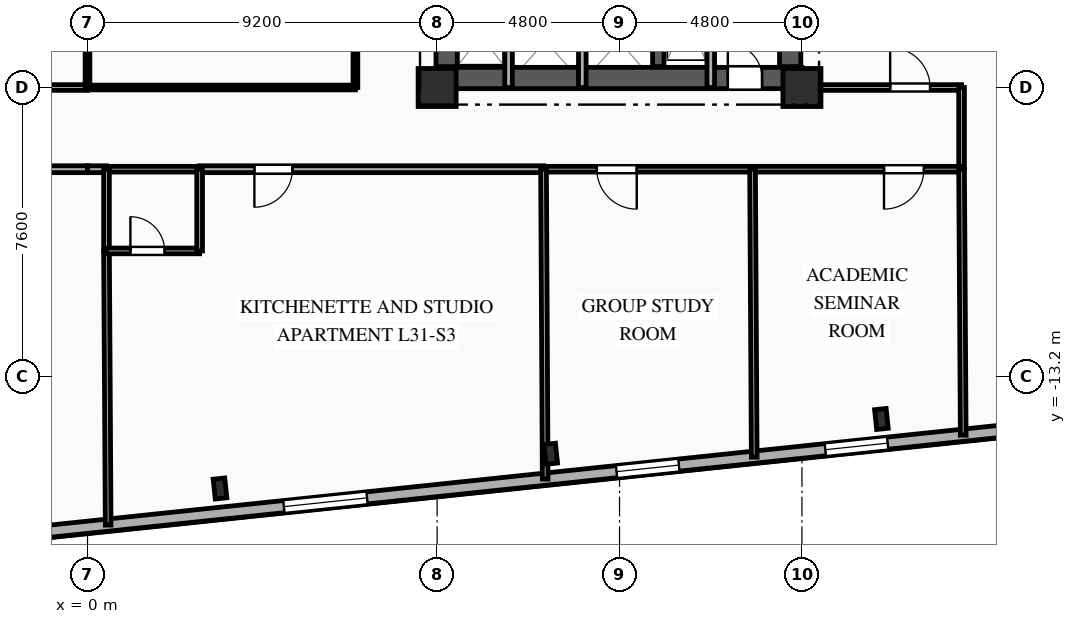
"""IFC4 building model, lengths in metres.
Left out: names, types, materials, properties, quantities, classifications, styles, units other than length and angle.
Written with IfcOpenShell. Run it as: python <this file> out.ifc"""

import sys

from ifc_helpers import new_model, si_unit, direction, frame, frame_2d, origin, origin_2d, place, context, subcontext, project, spatial, rectangle, i_section, extrude, element, fill, save


model = new_model("IFC4")
c1 = context("Model", 3, precision=1e-05, world=origin(), true_north=direction((0.0, 1.0)))
c2 = subcontext(c1, "Body", "Model", "MODEL_VIEW")
j1 = project(units=[si_unit("LENGTHUNIT", "METRE"), si_unit("PLANEANGLEUNIT", "RADIAN")], contexts=[c1])
p1 = place(None, origin())
s1 = spatial("IfcSite", under=j1, at=p1, CompositionType="ELEMENT")
p2 = place(p1, origin())
s2 = spatial("IfcBuilding", under=s1, at=p2, CompositionType="ELEMENT")
p3 = place(p2, frame((0.0, 0.0, 112.5)))
s3 = spatial("IfcBuildingStorey", under=s2, at=p3, CompositionType="ELEMENT", Elevation=112.5)
for number, where, z_axis, x_axis in (
    (1, (9.2, -5.6, 0.0), (0.0, 0.0, 1.0), (1.0, 0.0, 0.0)),
    (2, (18.8, -5.6, 0.0), (0.0, 0.0, 1.0), (1.0, 0.0, 0.0)),
):
    element("IfcColumn", number, at=place(p3, frame(where, z_axis=z_axis, x_axis=x_axis)), inside=s3, PredefinedType="COLUMN", context=c2, shape_type="SweptSolid", body=[
        extrude(rectangle(XDim=1.0, YDim=1.0, at=origin_2d()), origin(), (0.0, 0.0, 1.0), 3.35),
    ])
for number, where, z_axis, x_axis in (
    (3, (3.487, -16.151, 0.0), (0.0, 0.0, 1.0), (0.995, 0.105, 0.0)),
    (4, (12.189, -15.237, 0.0), (0.0, 0.0, 1.0), (0.995, 0.105, 0.0)),
    (5, (20.891, -14.322, 0.0), (0.0, 0.0, 1.0), (0.995, 0.105, 0.0)),
):
    element("IfcColumn", number, at=place(p3, frame(where, z_axis=z_axis, x_axis=x_axis)), inside=s3, PredefinedType="COLUMN", context=c2, shape_type="SweptSolid", body=[
        extrude(i_section(OverallWidth=0.306, OverallDepth=0.524, WebThickness=0.021, FlangeThickness=0.04, FilletRadius=0.027, at=origin_2d()), origin(), (0.0, 0.0, 1.0), 3.35),
    ])
p4 = place(p3, frame((30.307, -13.986, 0.0), z_axis=(0.0, 0.0, 1.0), x_axis=(-0.994521628355, -0.104531003701, 0.0)))
e6 = element("IfcWall", 6, at=p4, inside=s3, PredefinedType="SOLIDWALL", context=c2, shape_type="SweptSolid", body=[
    extrude(rectangle(XDim=53.8, YDim=0.32, at=frame_2d((26.9, 0.0))), origin(), (0.0, 0.0, 1.0), 3.045),
])
p5 = place(p4, frame((3.098, 0.0, 0.85)))
e7 = element("IfcOpeningElement", 7, at=p5, cuts=e6, PredefinedType="OPENING", context=c2, shape_type="SweptSolid", body=[
    extrude(rectangle(XDim=1.65, YDim=1.85, at=frame_2d((0.825, 0.925))), frame((0.0, 0.17, 0.0), z_axis=(0.0, -1.0, 0.0), x_axis=(1.0, 0.0, 0.0)), (0.0, 0.0, 1.0), 0.34),
])
p6 = place(p4, frame((9.302, 0.0, 0.85)))
e8 = element("IfcOpeningElement", 8, at=p6, cuts=e6, PredefinedType="OPENING", context=c2, shape_type="SweptSolid", body=[
    extrude(rectangle(XDim=1.65, YDim=1.85, at=frame_2d((0.825, 0.925))), frame((0.0, 0.17, 0.0), z_axis=(0.0, -1.0, 0.0), x_axis=(1.0, 0.0, 0.0)), (0.0, 0.0, 1.0), 0.34),
])
p7 = place(p4, frame((14.827, 0.0, 0.85)))
e9 = element("IfcOpeningElement", 9, at=p7, cuts=e6, PredefinedType="OPENING", context=c2, shape_type="SweptSolid", body=[
    extrude(rectangle(XDim=1.65, YDim=1.85, at=frame_2d((0.825, 0.925))), frame((0.0, 0.17, 0.0), z_axis=(0.0, -1.0, 0.0), x_axis=(1.0, 0.0, 0.0)), (0.0, 0.0, 1.0), 0.34),
])
p8 = place(p4, frame((23.078, 0.0, 0.85)))
e10 = element("IfcOpeningElement", 10, at=p8, cuts=e6, PredefinedType="OPENING", context=c2, shape_type="SweptSolid", body=[
    extrude(rectangle(XDim=2.2, YDim=1.85, at=frame_2d((1.1, 0.925))), frame((0.0, 0.17, 0.0), z_axis=(0.0, -1.0, 0.0), x_axis=(1.0, 0.0, 0.0)), (0.0, 0.0, 1.0), 0.34),
])
p9 = place(p4, frame((34.646, 0.0, 0.85)))
e11 = element("IfcOpeningElement", 11, at=p9, cuts=e6, PredefinedType="OPENING", context=c2, shape_type="SweptSolid", body=[
    extrude(rectangle(XDim=2.2, YDim=1.85, at=frame_2d((1.1, 0.925))), frame((0.0, 0.17, 0.0), z_axis=(0.0, -1.0, 0.0), x_axis=(1.0, 0.0, 0.0)), (0.0, 0.0, 1.0), 0.34),
])
p10 = place(p4, frame((43.728, 0.0, 0.85)))
e12 = element("IfcOpeningElement", 12, at=p10, cuts=e6, PredefinedType="OPENING", context=c2, shape_type="SweptSolid", body=[
    extrude(rectangle(XDim=1.65, YDim=1.85, at=frame_2d((0.825, 0.925))), frame((0.0, 0.17, 0.0), z_axis=(0.0, -1.0, 0.0), x_axis=(1.0, 0.0, 0.0)), (0.0, 0.0, 1.0), 0.34),
])
p11 = place(p4, frame((49.653, 0.0, 0.85)))
e13 = element("IfcOpeningElement", 13, at=p11, cuts=e6, PredefinedType="OPENING", context=c2, shape_type="SweptSolid", body=[
    extrude(rectangle(XDim=1.65, YDim=1.85, at=frame_2d((0.825, 0.925))), frame((0.0, 0.17, 0.0), z_axis=(0.0, -1.0, 0.0), x_axis=(1.0, 0.0, 0.0)), (0.0, 0.0, 1.0), 0.34),
])
p12 = place(p3, frame((9.2, -5.35, 0.0), z_axis=(0.0, 0.0, 1.0), x_axis=(1.0, 0.0, 0.0)))
e14 = element("IfcWall", 14, at=p12, inside=s3, PredefinedType="SHEAR", context=c2, shape_type="SweptSolid", body=[
    extrude(rectangle(XDim=9.6, YDim=0.56, at=frame_2d((4.8, 0.0))), origin(), (0.0, 0.0, 1.0), 3.045),
])
p13 = place(p12, frame((7.65, 0.0, 0.0)))
e15 = element("IfcOpeningElement", 15, at=p13, cuts=e14, PredefinedType="OPENING", context=c2, shape_type="SweptSolid", body=[
    extrude(rectangle(XDim=0.9, YDim=2.1, at=frame_2d((0.45, 1.05))), frame((0.0, 0.29, 0.0), z_axis=(0.0, -1.0, 0.0), x_axis=(1.0, 0.0, 0.0)), (0.0, 0.0, 1.0), 0.58),
])
p14 = place(p3, frame((9.45, -5.05, 0.0), z_axis=(0.0, 0.0, 1.0), x_axis=(0.0, 1.0, 0.0)))
e16 = element("IfcWall", 16, at=p14, inside=s3, PredefinedType="SHEAR", context=c2, shape_type="SweptSolid", body=[
    extrude(rectangle(XDim=10.1, YDim=0.56, at=frame_2d((5.05, 0.0))), origin(), (0.0, 0.0, 1.0), 3.045),
])
p15 = place(p14, frame((7.15, 0.0, 0.0)))
e17 = element("IfcOpeningElement", 17, at=p15, cuts=e16, PredefinedType="OPENING", context=c2, shape_type="SweptSolid", body=[
    extrude(rectangle(XDim=0.9, YDim=2.1, at=frame_2d((0.45, 1.05))), frame((0.0, 0.29, 0.0), z_axis=(0.0, -1.0, 0.0), x_axis=(1.0, 0.0, 0.0)), (0.0, 0.0, 1.0), 0.58),
])
p16 = place(p14, frame((2.4, 0.0, 0.0)))
e18 = element("IfcOpeningElement", 18, at=p16, cuts=e16, PredefinedType="OPENING", context=c2, shape_type="SweptSolid", body=[
    extrude(rectangle(XDim=1.2, YDim=2.15, at=frame_2d((0.6, 1.075))), frame((0.0, 0.29, 0.0), z_axis=(0.0, -1.0, 0.0), x_axis=(1.0, 0.0, 0.0)), (0.0, 0.0, 1.0), 0.58),
])
p17 = place(p3, frame((18.49, -5.05, 0.0), z_axis=(0.0, 0.0, 1.0), x_axis=(0.0, 1.0, 0.0)))
e19 = element("IfcWall", 19, at=p17, inside=s3, PredefinedType="SHEAR", context=c2, shape_type="SweptSolid", body=[
    extrude(rectangle(XDim=10.1, YDim=0.56, at=frame_2d((5.05, 0.0))), origin(), (0.0, 0.0, 1.0), 3.045),
])
p18 = place(p3, frame((15.02, -5.05, 0.0), z_axis=(0.0, 0.0, 1.0), x_axis=(0.0, 1.0, 0.0)))
e20 = element("IfcWall", 20, at=p18, inside=s3, PredefinedType="SHEAR", context=c2, shape_type="SweptSolid", body=[
    extrude(rectangle(XDim=10.1, YDim=0.3, at=frame_2d((5.05, 0.0))), origin(), (0.0, 0.0, 1.0), 3.045),
])
p19 = place(p3, frame((16.4, -2.11, 0.0), z_axis=(0.0, 0.0, 1.0), x_axis=(0.0, -1.0, 0.0)))
e21 = element("IfcWall", 21, at=p19, inside=s3, PredefinedType="PARTITIONING", context=c2, shape_type="SweptSolid", body=[
    extrude(rectangle(XDim=3.49, YDim=0.2, at=frame_2d((1.745, 0.0))), origin(), (0.0, 0.0, 1.0), 3.045),
])
for number, where, z_axis, x_axis in (
    (22, (11.08, -5.6, 0.0), (0.0, 0.0, 1.0), (0.0, 1.0, 0.0)),
    (23, (13.02, -5.6, 0.0), (0.0, 0.0, 1.0), (0.0, 1.0, 0.0)),
):
    element("IfcWall", number, at=place(p3, frame(where, z_axis=z_axis, x_axis=x_axis)), inside=s3, PredefinedType="PARTITIONING", context=c2, shape_type="SweptSolid", body=[
        extrude(rectangle(XDim=2.25, YDim=0.2, at=frame_2d((1.125, 0.0))), origin(), (0.0, 0.0, 1.0), 3.045),
    ])
p20 = place(p3, frame((0.0, -7.75, 0.0), z_axis=(0.0, 0.0, 1.0), x_axis=(-1.0, 0.0, 0.0)))
e24 = element("IfcWall", 24, at=p20, inside=s3, PredefinedType="PARTITIONING", context=c2, shape_type="SweptSolid", body=[
    extrude(rectangle(XDim=8.55, YDim=0.18, at=frame_2d((4.275, 0.0))), origin(), (0.0, 0.0, 1.0), 3.045),
])
p21 = place(p20, frame((1.379, 0.0, 0.0)))
e25 = element("IfcOpeningElement", 25, at=p21, cuts=e24, PredefinedType="OPENING", context=c2, shape_type="SweptSolid", body=[
    extrude(rectangle(XDim=1.0, YDim=2.15, at=frame_2d((0.5, 1.075))), frame((0.0, 0.1, 0.0), z_axis=(0.0, -1.0, 0.0), x_axis=(1.0, 0.0, 0.0)), (0.0, 0.0, 1.0), 0.2),
])
p22 = place(p3, frame((-7.05, -5.6, 0.0), z_axis=(0.0, 0.0, 1.0), x_axis=(1.0, 0.0, 0.0)))
e26 = element("IfcWall", 26, at=p22, inside=s3, PredefinedType="PARTITIONING", context=c2, shape_type="SweptSolid", body=[
    extrude(rectangle(XDim=7.05, YDim=0.15, at=frame_2d((3.525, 0.0))), origin(), (0.0, 0.0, 1.0), 2.53),
])
p23 = place(p3, frame((18.8, -5.6, 0.0), z_axis=(0.0, 0.0, 1.0), x_axis=(1.0, 0.0, 0.0)))
e27 = element("IfcWall", 27, at=p23, inside=s3, PredefinedType="PARTITIONING", context=c2, shape_type="SweptSolid", body=[
    extrude(rectangle(XDim=4.2, YDim=0.15, at=frame_2d((2.1, 0.0))), origin(), (0.0, 0.0, 1.0), 2.53),
])
p24 = place(p23, frame((2.321, 0.0, 0.0)))
e28 = element("IfcOpeningElement", 28, at=p24, cuts=e27, PredefinedType="OPENING", context=c2, shape_type="SweptSolid", body=[
    extrude(rectangle(XDim=1.05, YDim=2.15, at=frame_2d((0.525, 1.075))), frame((0.0, 0.085, 0.0), z_axis=(0.0, -1.0, 0.0), x_axis=(1.0, 0.0, 0.0)), (0.0, 0.0, 1.0), 0.17),
])
p25 = place(p3, frame((23.0, -5.6, 0.0), z_axis=(0.0, 0.0, 1.0), x_axis=(0.0, -1.0, 0.0)))
e29 = element("IfcWall", 29, at=p25, inside=s3, PredefinedType="PARTITIONING", context=c2, shape_type="SweptSolid", body=[
    extrude(rectangle(XDim=2.15, YDim=0.15, at=frame_2d((1.075, 0.0))), origin(), (0.0, 0.0, 1.0), 3.045),
])
p26 = place(p3, frame((0.5, -7.75, 0.0), z_axis=(0.0, 0.0, 1.0), x_axis=(-1.0, 0.0, 0.0)))
e30 = element("IfcWall", 30, at=p26, inside=s3, PredefinedType="PARTITIONING", context=c2, shape_type="SweptSolid", body=[
    extrude(rectangle(XDim=0.5, YDim=0.18, at=frame_2d((0.25, 0.0))), origin(), (0.0, 0.0, 1.0), 3.045),
])
p27 = place(p3, frame((12.0, -7.75, 0.0), z_axis=(0.0, 0.0, 1.0), x_axis=(-1.0, 0.0, 0.0)))
e31 = element("IfcWall", 31, at=p27, inside=s3, PredefinedType="PARTITIONING", context=c2, shape_type="SweptSolid", body=[
    extrude(rectangle(XDim=9.05, YDim=0.18, at=frame_2d((4.525, 0.0))), origin(), (0.0, 0.0, 1.0), 3.045),
])
p28 = place(p27, frame((6.609, 0.0, 0.0)))
e32 = element("IfcOpeningElement", 32, at=p28, cuts=e31, PredefinedType="OPENING", context=c2, shape_type="SweptSolid", body=[
    extrude(rectangle(XDim=1.0, YDim=2.15, at=frame_2d((0.5, 1.075))), frame((0.0, 0.1, 0.0), z_axis=(0.0, -1.0, 0.0), x_axis=(1.0, 0.0, 0.0)), (0.0, 0.0, 1.0), 0.2),
])
p29 = place(p3, frame((2.95, -7.75, 0.0), z_axis=(0.0, 0.0, 1.0), x_axis=(-1.0, 0.0, 0.0)))
e33 = element("IfcWall", 33, at=p29, inside=s3, PredefinedType="PLUMBINGWALL", context=c2, shape_type="SweptSolid", body=[
    extrude(rectangle(XDim=2.45, YDim=0.15, at=frame_2d((1.225, 0.0))), origin(), (0.0, 0.0, 1.0), 3.045),
])
p30 = place(p3, frame((17.5, -7.75, 0.0), z_axis=(0.0, 0.0, 1.0), x_axis=(-1.0, 0.0, 0.0)))
e34 = element("IfcWall", 34, at=p30, inside=s3, PredefinedType="PARTITIONING", context=c2, shape_type="SweptSolid", body=[
    extrude(rectangle(XDim=5.5, YDim=0.15, at=frame_2d((2.75, 0.0))), origin(), (0.0, 0.0, 1.0), 3.045),
])
p31 = place(p30, frame((3.048, 0.0, 0.0)))
e35 = element("IfcOpeningElement", 35, at=p31, cuts=e34, PredefinedType="OPENING", context=c2, shape_type="SweptSolid", body=[
    extrude(rectangle(XDim=1.05, YDim=2.15, at=frame_2d((0.525, 1.075))), frame((0.0, 0.085, 0.0), z_axis=(0.0, -1.0, 0.0), x_axis=(1.0, 0.0, 0.0)), (0.0, 0.0, 1.0), 0.17),
])
p32 = place(p3, frame((23.0, -7.75, 0.0), z_axis=(0.0, 0.0, 1.0), x_axis=(-1.0, 0.0, 0.0)))
e36 = element("IfcWall", 36, at=p32, inside=s3, PredefinedType="PARTITIONING", context=c2, shape_type="SweptSolid", body=[
    extrude(rectangle(XDim=5.5, YDim=0.15, at=frame_2d((2.75, 0.0))), origin(), (0.0, 0.0, 1.0), 3.045),
])
p33 = place(p32, frame((0.991, 0.0, 0.0)))
e37 = element("IfcOpeningElement", 37, at=p33, cuts=e36, PredefinedType="OPENING", context=c2, shape_type="SweptSolid", body=[
    extrude(rectangle(XDim=1.05, YDim=2.15, at=frame_2d((0.525, 1.075))), frame((0.0, 0.085, 0.0), z_axis=(0.0, -1.0, 0.0), x_axis=(1.0, 0.0, 0.0)), (0.0, 0.0, 1.0), 0.17),
])
p34 = place(p3, frame((0.0, -5.6, 0.0), z_axis=(0.0, 0.0, 1.0), x_axis=(1.0, 0.0, 0.0)))
e38 = element("IfcWall", 38, at=p34, inside=s3, PredefinedType="PARTITIONING", context=c2, shape_type="SweptSolid", body=[
    extrude(rectangle(XDim=7.05, YDim=0.125, at=frame_2d((3.525, 0.0))), origin(), (0.0, 0.0, 1.0), 2.53),
])
p35 = place(p3, frame((7.05, -5.6, 0.0), z_axis=(0.0, 0.0, 1.0), x_axis=(0.0, 1.0, 0.0)))
e39 = element("IfcWall", 39, at=p35, inside=s3, PredefinedType="PARTITIONING", context=c2, shape_type="SweptSolid", body=[
    extrude(rectangle(XDim=14.1, YDim=0.125, at=frame_2d((7.05, 0.0))), origin(), (0.0, 0.0, 1.0), 3.045),
])
p36 = place(p35, frame((5.076, 0.0, 0.0)))
e40 = element("IfcOpeningElement", 40, at=p36, cuts=e39, PredefinedType="OPENING", context=c2, shape_type="SweptSolid", body=[
    extrude(rectangle(XDim=0.95, YDim=2.1, at=frame_2d((0.475, 1.05))), frame((0.0, 0.073, 0.0), z_axis=(0.0, -1.0, 0.0), x_axis=(1.0, 0.0, 0.0)), (0.0, 0.0, 1.0), 0.145),
])
p37 = place(p3, frame((23.044, -14.749, 0.0), z_axis=(0.0, 0.0, 1.0), x_axis=(-0.006278653971, 0.999980289058, 0.0)))
e41 = element("IfcWall", 41, at=p37, inside=s3, PredefinedType="PARTITIONING", context=c2, shape_type="SweptSolid", body=[
    extrude(rectangle(XDim=6.999, YDim=0.15, at=frame_2d((3.5, 0.0))), origin(), (0.0, 0.0, 1.0), 3.045),
])
p38 = place(p3, frame((0.5, -9.9, 0.0), z_axis=(0.0, 0.0, 1.0), x_axis=(0.006091463685, -0.999981446863, 0.0)))
e42 = element("IfcWall", 42, at=p38, inside=s3, PredefinedType="PARTITIONING", context=c2, shape_type="SweptSolid", body=[
    extrude(rectangle(XDim=7.214, YDim=0.15, at=frame_2d((3.607, 0.0))), origin(), (0.0, 0.0, 1.0), 3.045),
])
p39 = place(p3, frame((0.5, -7.75, 0.0), z_axis=(0.0, 0.0, 1.0), x_axis=(0.0, -1.0, 0.0)))
e43 = element("IfcWall", 43, at=p39, inside=s3, PredefinedType="PLUMBINGWALL", context=c2, shape_type="SweptSolid", body=[
    extrude(rectangle(XDim=2.15, YDim=0.15, at=frame_2d((1.075, 0.0))), origin(), (0.0, 0.0, 1.0), 3.045),
])
p40 = place(p3, frame((0.5, -9.9, 0.0), z_axis=(0.0, 0.0, 1.0), x_axis=(1.0, 0.0, 0.0)))
e44 = element("IfcWall", 44, at=p40, inside=s3, PredefinedType="PLUMBINGWALL", context=c2, shape_type="SweptSolid", body=[
    extrude(rectangle(XDim=2.45, YDim=0.15, at=frame_2d((1.225, 0.0))), origin(), (0.0, 0.0, 1.0), 3.045),
])
p41 = place(p40, frame((0.629, 0.0, 0.0)))
e45 = element("IfcOpeningElement", 45, at=p41, cuts=e44, PredefinedType="OPENING", context=c2, shape_type="SweptSolid", body=[
    extrude(rectangle(XDim=0.9, YDim=2.1, at=frame_2d((0.45, 1.05))), frame((0.0, 0.085, 0.0), z_axis=(0.0, -1.0, 0.0), x_axis=(1.0, 0.0, 0.0)), (0.0, 0.0, 1.0), 0.17),
])
p42 = place(p3, frame((2.95, -9.9, 0.0), z_axis=(0.0, 0.0, 1.0), x_axis=(0.0, 1.0, 0.0)))
e46 = element("IfcWall", 46, at=p42, inside=s3, PredefinedType="PLUMBINGWALL", context=c2, shape_type="SweptSolid", body=[
    extrude(rectangle(XDim=2.15, YDim=0.15, at=frame_2d((1.075, 0.0))), origin(), (0.0, 0.0, 1.0), 3.045),
])
p43 = place(p3, frame((12.0, -7.75, 0.0), z_axis=(0.0, 0.0, 1.0), x_axis=(0.005388497987, -0.999985481939, 0.0)))
e47 = element("IfcWall", 47, at=p43, inside=s3, PredefinedType="PARTITIONING", context=c2, shape_type="SweptSolid", body=[
    extrude(rectangle(XDim=8.155, YDim=0.15, at=frame_2d((4.078, 0.0))), origin(), (0.0, 0.0, 1.0), 2.53),
])
p44 = place(p3, frame((17.5, -7.75, 0.0), z_axis=(0.0, 0.0, 1.0), x_axis=(0.005799618919, -0.999983182069, 0.0)))
e48 = element("IfcWall", 48, at=p44, inside=s3, PredefinedType="PARTITIONING", context=c2, shape_type="SweptSolid", body=[
    extrude(rectangle(XDim=7.577, YDim=0.15, at=frame_2d((3.789, 0.0))), origin(), (0.0, 0.0, 1.0), 3.045),
])
p45 = place(p3, frame((0.0, 8.5, 0.0), z_axis=(0.0, 0.0, 1.0), x_axis=(0.0, -1.0, 0.0)))
e49 = element("IfcWall", 49, at=p45, inside=s3, PredefinedType="PARTITIONING", context=c2, shape_type="SweptSolid", body=[
    extrude(rectangle(XDim=14.1, YDim=0.125, at=frame_2d((7.05, 0.0))), origin(), (0.0, 0.0, 1.0), 3.045),
])
p46 = place(p6, origin())
e50 = element("IfcWindow", 50, at=p46, inside=s3, PartitioningType="SINGLE_PANEL", PredefinedType="WINDOW", context=c2, shape_type="SweptSolid", body=[
    extrude(rectangle(XDim=1.65, YDim=1.85, at=frame_2d((0.825, 0.925))), frame((0.0, 0.03, 0.0), z_axis=(0.0, -1.0, 0.0), x_axis=(1.0, 0.0, 0.0)), (0.0, 0.0, 1.0), 0.06),
])
fill(e8, e50)
p47 = place(p7, origin())
e51 = element("IfcWindow", 51, at=p47, inside=s3, PartitioningType="SINGLE_PANEL", PredefinedType="WINDOW", context=c2, shape_type="SweptSolid", body=[
    extrude(rectangle(XDim=1.65, YDim=1.85, at=frame_2d((0.825, 0.925))), frame((0.0, 0.03, 0.0), z_axis=(0.0, -1.0, 0.0), x_axis=(1.0, 0.0, 0.0)), (0.0, 0.0, 1.0), 0.06),
])
fill(e9, e51)
p48 = place(p8, origin())
e52 = element("IfcWindow", 52, at=p48, inside=s3, PartitioningType="SINGLE_PANEL", PredefinedType="WINDOW", context=c2, shape_type="SweptSolid", body=[
    extrude(rectangle(XDim=2.2, YDim=1.85, at=frame_2d((1.1, 0.925))), frame((0.0, 0.03, 0.0), z_axis=(0.0, -1.0, 0.0), x_axis=(1.0, 0.0, 0.0)), (0.0, 0.0, 1.0), 0.06),
])
fill(e10, e52)
p49 = place(p13, origin())
e53 = element("IfcDoor", 53, at=p49, inside=s3, OperationType="SINGLE_SWING_LEFT", PredefinedType="DOOR", context=c2, shape_type="SweptSolid", body=[
    extrude(rectangle(XDim=0.9, YDim=2.1, at=frame_2d((0.45, 1.05))), frame((0.0, 0.025, 0.0), z_axis=(0.0, -1.0, 0.0), x_axis=(1.0, 0.0, 0.0)), (0.0, 0.0, 1.0), 0.05),
])
fill(e15, e53)
p50 = place(p24, origin())
e54 = element("IfcDoor", 54, at=p50, inside=s3, OperationType="SINGLE_SWING_LEFT", PredefinedType="DOOR", context=c2, shape_type="SweptSolid", body=[
    extrude(rectangle(XDim=1.05, YDim=2.15, at=frame_2d((0.525, 1.075))), frame((0.0, 0.025, 0.0), z_axis=(0.0, -1.0, 0.0), x_axis=(1.0, 0.0, 0.0)), (0.0, 0.0, 1.0), 0.05),
])
fill(e28, e54)
p51 = place(p28, origin())
e55 = element("IfcDoor", 55, at=p51, inside=s3, OperationType="SINGLE_SWING_RIGHT", PredefinedType="DOOR", context=c2, shape_type="SweptSolid", body=[
    extrude(rectangle(XDim=1.0, YDim=2.15, at=frame_2d((0.5, 1.075))), frame((0.0, 0.025, 0.0), z_axis=(0.0, -1.0, 0.0), x_axis=(1.0, 0.0, 0.0)), (0.0, 0.0, 1.0), 0.05),
])
fill(e32, e55)
p52 = place(p31, origin())
e56 = element("IfcDoor", 56, at=p52, inside=s3, OperationType="SINGLE_SWING_LEFT", PredefinedType="DOOR", context=c2, shape_type="SweptSolid", body=[
    extrude(rectangle(XDim=1.05, YDim=2.15, at=frame_2d((0.525, 1.075))), frame((0.0, 0.025, 0.0), z_axis=(0.0, -1.0, 0.0), x_axis=(1.0, 0.0, 0.0)), (0.0, 0.0, 1.0), 0.05),
])
fill(e35, e56)
p53 = place(p33, origin())
e57 = element("IfcDoor", 57, at=p53, inside=s3, OperationType="SINGLE_SWING_RIGHT", PredefinedType="DOOR", context=c2, shape_type="SweptSolid", body=[
    extrude(rectangle(XDim=1.05, YDim=2.15, at=frame_2d((0.525, 1.075))), frame((0.0, 0.025, 0.0), z_axis=(0.0, -1.0, 0.0), x_axis=(1.0, 0.0, 0.0)), (0.0, 0.0, 1.0), 0.05),
])
fill(e37, e57)
p54 = place(p41, origin())
e58 = element("IfcDoor", 58, at=p54, inside=s3, OperationType="SINGLE_SWING_LEFT", PredefinedType="DOOR", context=c2, shape_type="SweptSolid", body=[
    extrude(rectangle(XDim=0.9, YDim=2.1, at=frame_2d((0.45, 1.05))), frame((0.0, 0.025, 0.0), z_axis=(0.0, -1.0, 0.0), x_axis=(1.0, 0.0, 0.0)), (0.0, 0.0, 1.0), 0.05),
])
fill(e45, e58)
save(model, sys.argv[1])
